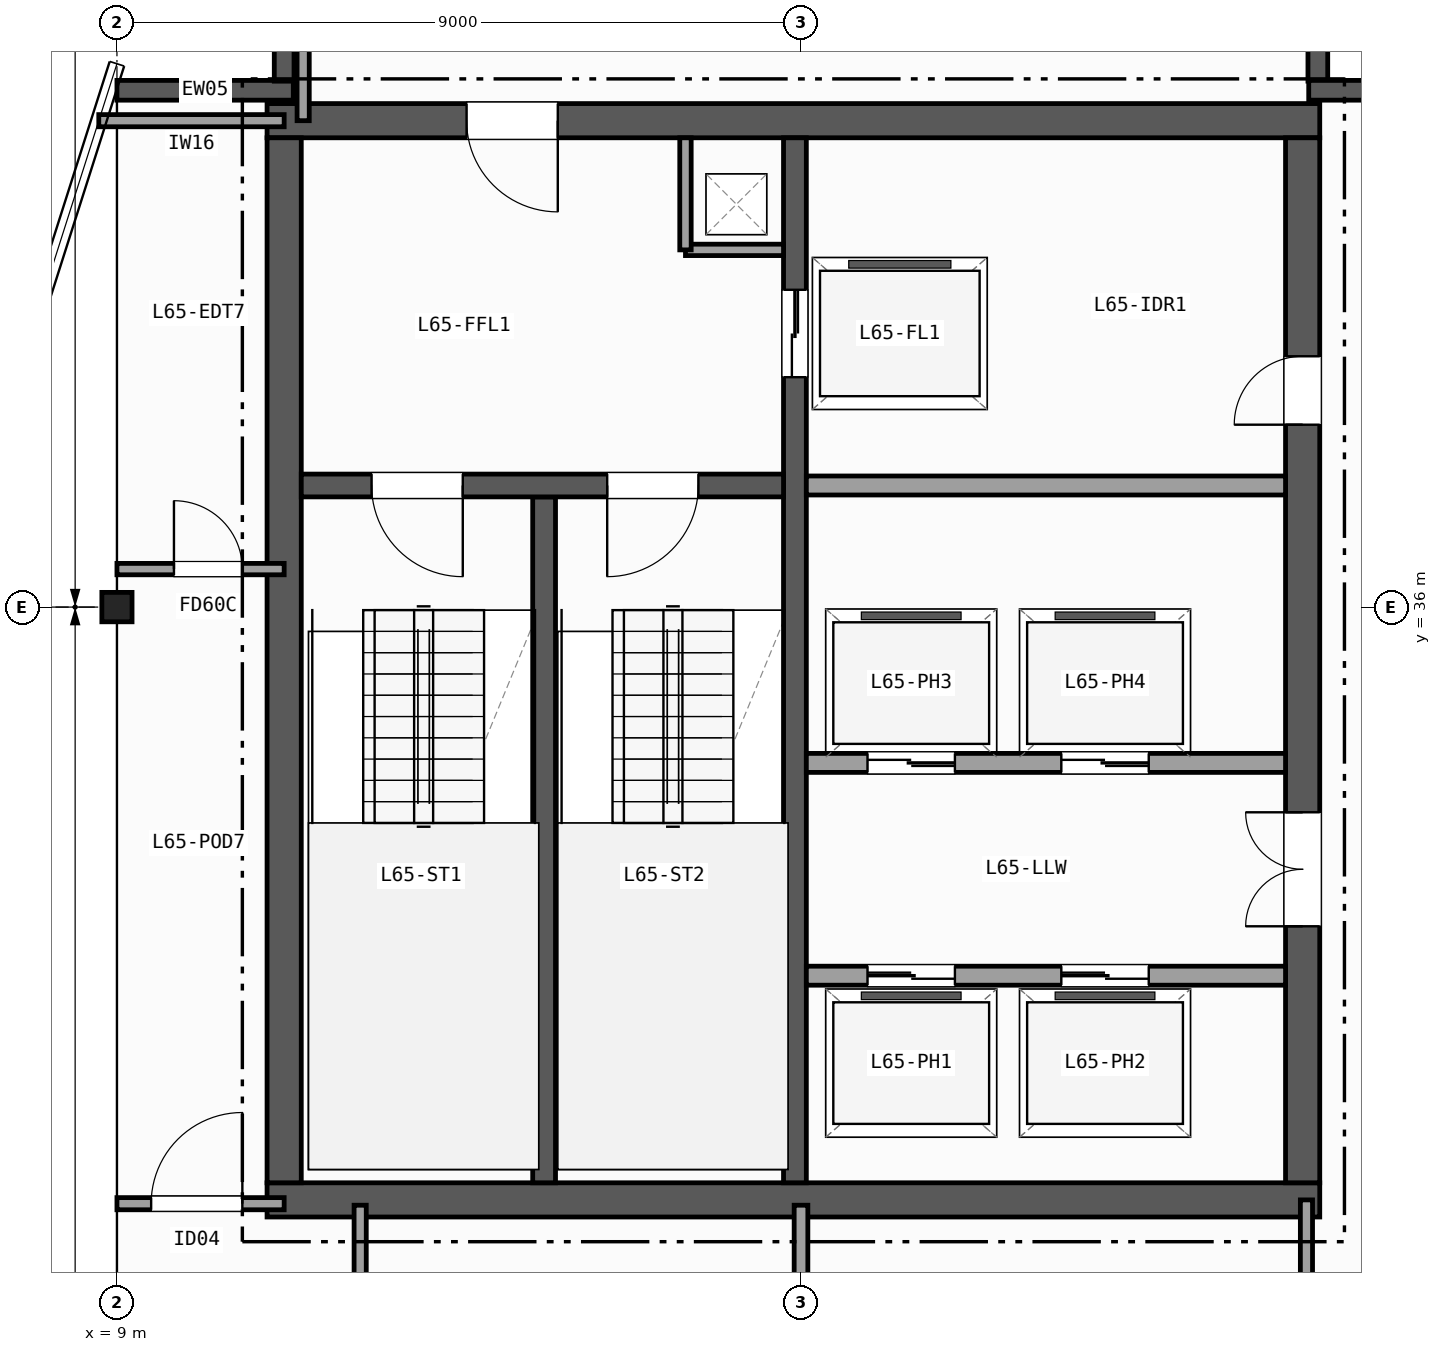
"""IFC4 building model, lengths in metres.
Left out: names, types, materials, properties, quantities, classifications, styles, units other than length and angle.
Written with IfcOpenShell. Run it as: python <this file> out.ifc"""

import sys

from ifc_helpers import new_model, si_unit, direction, frame, frame_2d, origin, origin_2d, place, context, subcontext, project, spatial, rectangle, i_section, extrude, element, fill, save


model = new_model("IFC4")
c1 = context("Model", 3, precision=1e-05, world=origin(), true_north=direction((0.0, 1.0)))
c2 = subcontext(c1, "Body", "Model", "MODEL_VIEW")
j1 = project(units=[si_unit("LENGTHUNIT", "METRE"), si_unit("PLANEANGLEUNIT", "RADIAN")], contexts=[c1])
p1 = place(None, origin())
s1 = spatial("IfcSite", under=j1, at=p1, CompositionType="ELEMENT")
p2 = place(p1, origin())
s2 = spatial("IfcBuilding", under=s1, at=p2, CompositionType="ELEMENT")
p3 = place(p2, frame((0.0, 0.0, 259.3)))
s3 = spatial("IfcBuildingStorey", under=s2, at=p3, CompositionType="ELEMENT", Elevation=259.3)
p4 = place(p3, frame((9.0, 36.0, 0.0), z_axis=(0.0, 0.0, 1.0), x_axis=(1.0, 0.0, 0.0)))
e1 = element("IfcColumn", 1, at=p4, inside=s3, PredefinedType="COLUMN", context=c2, shape_type="SweptSolid", body=[
    extrude(i_section(OverallWidth=0.397, OverallDepth=0.387, WebThickness=0.021, FlangeThickness=0.033, FilletRadius=0.015, at=origin_2d()), origin(), (0.0, 0.0, 1.0), 3.7),
])
p5 = place(p3, frame((9.0, 42.8, 0.0), z_axis=(0.0, 0.0, 1.0), x_axis=(1.0, 0.0, 0.0)))
e2 = element("IfcWall", 2, at=p5, inside=s3, PredefinedType="SOLIDWALL", context=c2, shape_type="SweptSolid", body=[
    extrude(rectangle(XDim=2.32, YDim=0.26, at=frame_2d((1.16, 0.0))), origin(), (0.0, 0.0, 1.0), 3.42),
])
for number, where, z_axis, x_axis in (
    (3, (11.2, 42.92, 0.0), (0.0, 0.0, 1.0), (0.0, 1.0, 0.0)),
    (4, (24.8, 45.0, 0.0), (0.0, 0.0, 1.0), (0.0, -1.0, 0.0)),
):
    element("IfcWall", number, at=place(p3, frame(where, z_axis=z_axis, x_axis=x_axis)), inside=s3, PredefinedType="SOLIDWALL", context=c2, shape_type="SweptSolid", body=[
        extrude(rectangle(XDim=2.08, YDim=0.26, at=frame_2d((1.04, 0.0))), origin(), (0.0, 0.0, 1.0), 3.42),
    ])
p6 = place(p3, frame((24.68, 42.8, 0.0), z_axis=(0.0, 0.0, 1.0), x_axis=(1.0, 0.0, 0.0)))
e5 = element("IfcWall", 5, at=p6, inside=s3, PredefinedType="SOLIDWALL", context=c2, shape_type="SweptSolid", body=[
    extrude(rectangle(XDim=2.32, YDim=0.26, at=frame_2d((1.16, 0.0))), origin(), (0.0, 0.0, 1.0), 3.42),
])
p7 = place(p3, frame((10.975, 28.2, 0.0), z_axis=(0.0, 0.0, 1.0), x_axis=(1.0, 0.0, 0.0)))
e6 = element("IfcWall", 6, at=p7, inside=s3, PredefinedType="SHEAR", context=c2, shape_type="SweptSolid", body=[
    extrude(rectangle(XDim=13.85, YDim=0.45, at=frame_2d((6.925, 0.0))), origin(), (0.0, 0.0, 1.0), 3.42),
])
p8 = place(p3, frame((24.825, 42.4, 0.0), z_axis=(0.0, 0.0, 1.0), x_axis=(-1.0, 0.0, 0.0)))
e7 = element("IfcWall", 7, at=p8, inside=s3, PredefinedType="SHEAR", context=c2, shape_type="SweptSolid", body=[
    extrude(rectangle(XDim=13.85, YDim=0.45, at=frame_2d((6.925, 0.0))), origin(), (0.0, 0.0, 1.0), 3.42),
])
p9 = place(p8, frame((10.025, 0.0, 0.0)))
e8 = element("IfcOpeningElement", 8, at=p9, cuts=e7, PredefinedType="OPENING", context=c2, shape_type="SweptSolid", body=[
    extrude(rectangle(XDim=1.2, YDim=2.15, at=frame_2d((0.6, 1.075))), frame((0.0, 0.235, 0.0), z_axis=(0.0, -1.0, 0.0), x_axis=(1.0, 0.0, 0.0)), (0.0, 0.0, 1.0), 0.47),
])
p10 = place(p3, frame((11.2, 42.175, 0.0), z_axis=(0.0, 0.0, 1.0), x_axis=(0.0, -1.0, 0.0)))
e9 = element("IfcWall", 9, at=p10, inside=s3, PredefinedType="SHEAR", context=c2, shape_type="SweptSolid", body=[
    extrude(rectangle(XDim=13.75, YDim=0.45, at=frame_2d((6.875, 0.0))), origin(), (0.0, 0.0, 1.0), 3.42),
])
p11 = place(p3, frame((24.6, 28.425, 0.0), z_axis=(0.0, 0.0, 1.0), x_axis=(0.0, 1.0, 0.0)))
e10 = element("IfcWall", 10, at=p11, inside=s3, PredefinedType="SHEAR", context=c2, shape_type="SweptSolid", body=[
    extrude(rectangle(XDim=13.75, YDim=0.45, at=frame_2d((6.875, 0.0))), origin(), (0.0, 0.0, 1.0), 3.42),
])
p12 = place(p11, frame((3.375, 0.0, 0.0)))
e11 = element("IfcOpeningElement", 11, at=p12, cuts=e10, PredefinedType="OPENING", context=c2, shape_type="SweptSolid", body=[
    extrude(rectangle(XDim=1.5, YDim=2.2, at=frame_2d((0.75, 1.1))), frame((0.0, 0.235, 0.0), z_axis=(0.0, -1.0, 0.0), x_axis=(1.0, 0.0, 0.0)), (0.0, 0.0, 1.0), 0.47),
])
p13 = place(p11, frame((9.975, 0.0, 0.0)))
e12 = element("IfcOpeningElement", 12, at=p13, cuts=e10, PredefinedType="OPENING", context=c2, shape_type="SweptSolid", body=[
    extrude(rectangle(XDim=0.9, YDim=2.1, at=frame_2d((0.45, 1.05))), frame((0.0, 0.235, 0.0), z_axis=(0.0, -1.0, 0.0), x_axis=(1.0, 0.0, 0.0)), (0.0, 0.0, 1.0), 0.47),
])
p14 = place(p3, frame((14.62, 28.425, 0.0), z_axis=(0.0, 0.0, 1.0), x_axis=(0.0, 1.0, 0.0)))
e13 = element("IfcWall", 13, at=p14, inside=s3, PredefinedType="SHEAR", context=c2, shape_type="SweptSolid", body=[
    extrude(rectangle(XDim=9.025, YDim=0.3, at=frame_2d((4.512, 0.0))), origin(), (0.0, 0.0, 1.0), 3.42),
])
p15 = place(p3, frame((17.92, 42.175, 0.0), z_axis=(0.0, 0.0, 1.0), x_axis=(0.0, -1.0, 0.0)))
e14 = element("IfcWall", 14, at=p15, inside=s3, PredefinedType="SHEAR", context=c2, shape_type="SweptSolid", body=[
    extrude(rectangle(XDim=13.75, YDim=0.3, at=frame_2d((6.875, 0.0))), origin(), (0.0, 0.0, 1.0), 3.42),
])
p16 = place(p15, frame((2.0, 0.0, 0.0)))
e15 = element("IfcOpeningElement", 15, at=p16, cuts=e14, PredefinedType="OPENING", context=c2, shape_type="SweptSolid", body=[
    extrude(rectangle(XDim=1.15, YDim=2.15, at=frame_2d((0.575, 1.075))), frame((0.0, 0.16, 0.0), z_axis=(0.0, -1.0, 0.0), x_axis=(1.0, 0.0, 0.0)), (0.0, 0.0, 1.0), 0.32),
])
p17 = place(p3, frame((17.77, 37.6, 0.0), z_axis=(0.0, 0.0, 1.0), x_axis=(-1.0, 0.0, 0.0)))
e16 = element("IfcWall", 16, at=p17, inside=s3, PredefinedType="SHEAR", context=c2, shape_type="SweptSolid", body=[
    extrude(rectangle(XDim=6.345, YDim=0.3, at=frame_2d((3.172, 0.0))), origin(), (0.0, 0.0, 1.0), 3.42),
])
p18 = place(p17, frame((4.22, 0.0, 0.0)))
e17 = element("IfcOpeningElement", 17, at=p18, cuts=e16, PredefinedType="OPENING", context=c2, shape_type="SweptSolid", body=[
    extrude(rectangle(XDim=1.2, YDim=2.15, at=frame_2d((0.6, 1.075))), frame((0.0, 0.16, 0.0), z_axis=(0.0, -1.0, 0.0), x_axis=(1.0, 0.0, 0.0)), (0.0, 0.0, 1.0), 0.32),
])
p19 = place(p17, frame((1.12, 0.0, 0.0)))
e18 = element("IfcOpeningElement", 18, at=p19, cuts=e16, PredefinedType="OPENING", context=c2, shape_type="SweptSolid", body=[
    extrude(rectangle(XDim=1.2, YDim=2.15, at=frame_2d((0.6, 1.075))), frame((0.0, 0.16, 0.0), z_axis=(0.0, -1.0, 0.0), x_axis=(1.0, 0.0, 0.0)), (0.0, 0.0, 1.0), 0.32),
])
p20 = place(p3, frame((16.48, 40.7, 0.0), z_axis=(0.0, 0.0, 1.0), x_axis=(1.0, 0.0, 0.0)))
e19 = element("IfcWall", 19, at=p20, inside=s3, PredefinedType="PARTITIONING", context=c2, shape_type="SweptSolid", body=[
    extrude(rectangle(XDim=1.29, YDim=0.15, at=frame_2d((0.645, 0.0))), origin(), (0.0, 0.0, 1.0), 3.42),
])
p21 = place(p3, frame((16.48, 40.7, 0.0), z_axis=(0.0, 0.0, 1.0), x_axis=(0.0, 1.0, 0.0)))
e20 = element("IfcWall", 20, at=p21, inside=s3, PredefinedType="PARTITIONING", context=c2, shape_type="SweptSolid", body=[
    extrude(rectangle(XDim=1.475, YDim=0.15, at=frame_2d((0.738, 0.0))), origin(), (0.0, 0.0, 1.0), 3.42),
])
p22 = place(p3, frame((18.07, 37.6, 0.0), z_axis=(0.0, 0.0, 1.0), x_axis=(1.0, 0.0, 0.0)))
e21 = element("IfcWall", 21, at=p22, inside=s3, PredefinedType="PARTITIONING", context=c2, shape_type="SweptSolid", body=[
    extrude(rectangle(XDim=6.305, YDim=0.25, at=frame_2d((3.152, 0.0))), origin(), (0.0, 0.0, 1.0), 3.42),
])
p23 = place(p3, frame((18.07, 31.15, 0.0), z_axis=(0.0, 0.0, 1.0), x_axis=(1.0, 0.0, 0.0)))
e22 = element("IfcWall", 22, at=p23, inside=s3, PredefinedType="PARTITIONING", context=c2, shape_type="SweptSolid", body=[
    extrude(rectangle(XDim=6.305, YDim=0.25, at=frame_2d((3.152, 0.0))), origin(), (0.0, 0.0, 1.0), 3.42),
])
p24 = place(p23, frame((0.805, 0.0, 0.0)))
e23 = element("IfcOpeningElement", 23, at=p24, cuts=e22, PredefinedType="OPENING", context=c2, shape_type="SweptSolid", body=[
    extrude(rectangle(XDim=1.15, YDim=2.15, at=frame_2d((0.575, 1.075))), frame((0.0, 0.135, 0.0), z_axis=(0.0, -1.0, 0.0), x_axis=(1.0, 0.0, 0.0)), (0.0, 0.0, 1.0), 0.27),
])
p25 = place(p23, frame((3.355, 0.0, 0.0)))
e24 = element("IfcOpeningElement", 24, at=p25, cuts=e22, PredefinedType="OPENING", context=c2, shape_type="SweptSolid", body=[
    extrude(rectangle(XDim=1.15, YDim=2.15, at=frame_2d((0.575, 1.075))), frame((0.0, 0.135, 0.0), z_axis=(0.0, -1.0, 0.0), x_axis=(1.0, 0.0, 0.0)), (0.0, 0.0, 1.0), 0.27),
])
p26 = place(p3, frame((24.375, 33.95, 0.0), z_axis=(0.0, 0.0, 1.0), x_axis=(-1.0, 0.0, 0.0)))
e25 = element("IfcWall", 25, at=p26, inside=s3, PredefinedType="PARTITIONING", context=c2, shape_type="SweptSolid", body=[
    extrude(rectangle(XDim=6.305, YDim=0.25, at=frame_2d((3.152, 0.0))), origin(), (0.0, 0.0, 1.0), 3.42),
])
p27 = place(p26, frame((4.35, 0.0, 0.0)))
e26 = element("IfcOpeningElement", 26, at=p27, cuts=e25, PredefinedType="OPENING", context=c2, shape_type="SweptSolid", body=[
    extrude(rectangle(XDim=1.15, YDim=2.15, at=frame_2d((0.575, 1.075))), frame((0.0, 0.135, 0.0), z_axis=(0.0, -1.0, 0.0), x_axis=(1.0, 0.0, 0.0)), (0.0, 0.0, 1.0), 0.27),
])
p28 = place(p26, frame((1.8, 0.0, 0.0)))
e27 = element("IfcOpeningElement", 27, at=p28, cuts=e25, PredefinedType="OPENING", context=c2, shape_type="SweptSolid", body=[
    extrude(rectangle(XDim=1.15, YDim=2.15, at=frame_2d((0.575, 1.075))), frame((0.0, 0.135, 0.0), z_axis=(0.0, -1.0, 0.0), x_axis=(1.0, 0.0, 0.0)), (0.0, 0.0, 1.0), 0.27),
])
p29 = place(p3, frame((9.0, 28.15, 0.0), z_axis=(0.0, 0.0, 1.0), x_axis=(1.0, 0.0, 0.0)))
e28 = element("IfcWall", 28, at=p29, inside=s3, PredefinedType="PARTITIONING", context=c2, shape_type="SweptSolid", body=[
    extrude(rectangle(XDim=2.2, YDim=0.16, at=frame_2d((1.1, 0.0))), origin(), (0.0, 0.0, 1.0), 2.707),
])
p30 = place(p29, frame((0.45, 0.0, 0.0)))
e29 = element("IfcOpeningElement", 29, at=p30, cuts=e28, PredefinedType="OPENING", context=c2, shape_type="SweptSolid", body=[
    extrude(rectangle(XDim=1.2, YDim=2.15, at=frame_2d((0.6, 1.075))), frame((0.0, 0.09, 0.0), z_axis=(0.0, -1.0, 0.0), x_axis=(1.0, 0.0, 0.0)), (0.0, 0.0, 1.0), 0.18),
])
p31 = place(p3, frame((8.761, 42.4, 0.0), z_axis=(0.0, 0.0, 1.0), x_axis=(1.0, 0.0, 0.0)))
e30 = element("IfcWall", 30, at=p31, inside=s3, PredefinedType="PARTITIONING", context=c2, shape_type="SweptSolid", body=[
    extrude(rectangle(XDim=2.439, YDim=0.16, at=frame_2d((1.219, 0.0))), origin(), (0.0, 0.0, 1.0), 3.42),
])
p32 = place(p3, frame((11.45, 42.4, 0.0), z_axis=(0.0, 0.0, 1.0), x_axis=(0.0, 1.0, 0.0)))
e31 = element("IfcWall", 31, at=p32, inside=s3, PredefinedType="PARTITIONING", context=c2, shape_type="SweptSolid", body=[
    extrude(rectangle(XDim=2.666, YDim=0.16, at=frame_2d((1.333, 0.0))), origin(), (0.0, 0.0, 1.0), 3.42),
])
p33 = place(p3, frame((9.0, 36.5, 0.0), z_axis=(0.0, 0.0, 1.0), x_axis=(1.0, 0.0, 0.0)))
e32 = element("IfcWall", 32, at=p33, inside=s3, PredefinedType="PARTITIONING", context=c2, shape_type="SweptSolid", body=[
    extrude(rectangle(XDim=2.2, YDim=0.15, at=frame_2d((1.1, 0.0))), origin(), (0.0, 0.0, 1.0), 3.42),
])
p34 = place(p33, frame((0.75, 0.0, 0.0)))
e33 = element("IfcOpeningElement", 33, at=p34, cuts=e32, PredefinedType="OPENING", context=c2, shape_type="SweptSolid", body=[
    extrude(rectangle(XDim=0.9, YDim=2.1, at=frame_2d((0.45, 1.05))), frame((0.0, 0.085, 0.0), z_axis=(0.0, -1.0, 0.0), x_axis=(1.0, 0.0, 0.0)), (0.0, 0.0, 1.0), 0.17),
])
p35 = place(p3, frame((24.65, 9.0, 0.0), z_axis=(0.0, 0.0, 1.0), x_axis=(0.0, 1.0, 0.0)))
e34 = element("IfcWall", 34, at=p35, inside=s3, PredefinedType="PARTITIONING", context=c2, shape_type="SweptSolid", body=[
    extrude(rectangle(XDim=19.2, YDim=0.16, at=frame_2d((9.6, 0.0))), origin(), (0.0, 0.0, 1.0), 2.707),
])
p36 = place(p35, frame((8.6, 0.0, 0.0)))
e35 = element("IfcOpeningElement", 35, at=p36, cuts=e34, PredefinedType="OPENING", context=c2, shape_type="SweptSolid", body=[
    extrude(rectangle(XDim=0.95, YDim=2.1, at=frame_2d((0.475, 1.05))), frame((0.0, 0.09, 0.0), z_axis=(0.0, -1.0, 0.0), x_axis=(1.0, 0.0, 0.0)), (0.0, 0.0, 1.0), 0.18),
])
p37 = place(p35, frame((2.55, 0.0, 0.0)))
e36 = element("IfcOpeningElement", 36, at=p37, cuts=e34, PredefinedType="OPENING", context=c2, shape_type="SweptSolid", body=[
    extrude(rectangle(XDim=1.0, YDim=2.1, at=frame_2d((0.5, 1.05))), frame((0.0, 0.09, 0.0), z_axis=(0.0, -1.0, 0.0), x_axis=(1.0, 0.0, 0.0)), (0.0, 0.0, 1.0), 0.18),
])
p38 = place(p3, frame((18.0, 15.8, 0.0), z_axis=(0.0, 0.0, 1.0), x_axis=(0.0, 1.0, 0.0)))
e37 = element("IfcWall", 37, at=p38, inside=s3, PredefinedType="PARTITIONING", context=c2, shape_type="SweptSolid", body=[
    extrude(rectangle(XDim=12.33, YDim=0.18, at=frame_2d((6.165, 0.0))), origin(), (0.0, 0.0, 1.0), 2.789),
])
p39 = place(p38, frame((5.7, 0.0, 0.0)))
e38 = element("IfcOpeningElement", 38, at=p39, cuts=e37, PredefinedType="OPENING", context=c2, shape_type="SweptSolid", body=[
    extrude(rectangle(XDim=1.05, YDim=2.15, at=frame_2d((0.525, 1.075))), frame((0.0, 0.1, 0.0), z_axis=(0.0, -1.0, 0.0), x_axis=(1.0, 0.0, 0.0)), (0.0, 0.0, 1.0), 0.2),
])
p40 = place(p3, frame((12.2, 18.0, 0.0), z_axis=(0.0, 0.0, 1.0), x_axis=(0.0, 1.0, 0.0)))
e39 = element("IfcWall", 39, at=p40, inside=s3, PredefinedType="PARTITIONING", context=c2, shape_type="SweptSolid", body=[
    extrude(rectangle(XDim=10.13, YDim=0.16, at=frame_2d((5.065, 0.0))), origin(), (0.0, 0.0, 1.0), 2.789),
])
p41 = place(p40, frame((2.5, 0.0, 0.0)))
e40 = element("IfcOpeningElement", 40, at=p41, cuts=e39, PredefinedType="OPENING", context=c2, shape_type="SweptSolid", body=[
    extrude(rectangle(XDim=1.2, YDim=2.15, at=frame_2d((0.6, 1.075))), frame((0.0, 0.09, 0.0), z_axis=(0.0, -1.0, 0.0), x_axis=(1.0, 0.0, 0.0)), (0.0, 0.0, 1.0), 0.18),
])
p42 = place(p18, origin())
e41 = element("IfcDoor", 41, at=p42, inside=s3, OperationType="SINGLE_SWING_LEFT", PredefinedType="DOOR", context=c2, shape_type="SweptSolid", body=[
    extrude(rectangle(XDim=1.2, YDim=2.15, at=frame_2d((0.6, 1.075))), frame((0.0, 0.025, 0.0), z_axis=(0.0, -1.0, 0.0), x_axis=(1.0, 0.0, 0.0)), (0.0, 0.0, 1.0), 0.05),
])
fill(e17, e41)
p43 = place(p19, origin())
e42 = element("IfcDoor", 42, at=p43, inside=s3, OperationType="SINGLE_SWING_RIGHT", PredefinedType="DOOR", context=c2, shape_type="SweptSolid", body=[
    extrude(rectangle(XDim=1.2, YDim=2.15, at=frame_2d((0.6, 1.075))), frame((0.0, 0.025, 0.0), z_axis=(0.0, -1.0, 0.0), x_axis=(1.0, 0.0, 0.0)), (0.0, 0.0, 1.0), 0.05),
])
fill(e18, e42)
p44 = place(p12, origin())
e43 = element("IfcDoor", 43, at=p44, inside=s3, OperationType="DOUBLE_DOOR_SINGLE_SWING", PredefinedType="DOOR", context=c2, shape_type="SweptSolid", body=[
    extrude(rectangle(XDim=1.5, YDim=2.2, at=frame_2d((0.75, 1.1))), frame((0.0, 0.025, 0.0), z_axis=(0.0, -1.0, 0.0), x_axis=(1.0, 0.0, 0.0)), (0.0, 0.0, 1.0), 0.05),
])
fill(e11, e43)
p45 = place(p9, origin())
e44 = element("IfcDoor", 44, at=p45, inside=s3, OperationType="SINGLE_SWING_LEFT", PredefinedType="DOOR", context=c2, shape_type="SweptSolid", body=[
    extrude(rectangle(XDim=1.2, YDim=2.15, at=frame_2d((0.6, 1.075))), frame((0.0, 0.025, 0.0), z_axis=(0.0, -1.0, 0.0), x_axis=(1.0, 0.0, 0.0)), (0.0, 0.0, 1.0), 0.05),
])
fill(e8, e44)
p46 = place(p13, origin())
e45 = element("IfcDoor", 45, at=p46, inside=s3, OperationType="SINGLE_SWING_LEFT", PredefinedType="DOOR", context=c2, shape_type="SweptSolid", body=[
    extrude(rectangle(XDim=0.9, YDim=2.1, at=frame_2d((0.45, 1.05))), frame((0.0, 0.025, 0.0), z_axis=(0.0, -1.0, 0.0), x_axis=(1.0, 0.0, 0.0)), (0.0, 0.0, 1.0), 0.05),
])
fill(e12, e45)
p47 = place(p16, origin())
e46 = element("IfcDoor", 46, at=p47, inside=s3, OperationType="DOUBLE_DOOR_SLIDING", PredefinedType="DOOR", context=c2, shape_type="SweptSolid", body=[
    extrude(rectangle(XDim=1.15, YDim=2.15, at=frame_2d((0.575, 1.075))), frame((0.0, 0.025, 0.0), z_axis=(0.0, -1.0, 0.0), x_axis=(1.0, 0.0, 0.0)), (0.0, 0.0, 1.0), 0.05),
])
fill(e15, e46)
p48 = place(p24, origin())
e47 = element("IfcDoor", 47, at=p48, inside=s3, OperationType="DOUBLE_DOOR_SLIDING", PredefinedType="DOOR", context=c2, shape_type="SweptSolid", body=[
    extrude(rectangle(XDim=1.15, YDim=2.15, at=frame_2d((0.575, 1.075))), frame((0.0, 0.025, 0.0), z_axis=(0.0, -1.0, 0.0), x_axis=(1.0, 0.0, 0.0)), (0.0, 0.0, 1.0), 0.05),
])
fill(e23, e47)
p49 = place(p25, origin())
e48 = element("IfcDoor", 48, at=p49, inside=s3, OperationType="DOUBLE_DOOR_SLIDING", PredefinedType="DOOR", context=c2, shape_type="SweptSolid", body=[
    extrude(rectangle(XDim=1.15, YDim=2.15, at=frame_2d((0.575, 1.075))), frame((0.0, 0.025, 0.0), z_axis=(0.0, -1.0, 0.0), x_axis=(1.0, 0.0, 0.0)), (0.0, 0.0, 1.0), 0.05),
])
fill(e24, e48)
p50 = place(p27, origin())
e49 = element("IfcDoor", 49, at=p50, inside=s3, OperationType="DOUBLE_DOOR_SLIDING", PredefinedType="DOOR", context=c2, shape_type="SweptSolid", body=[
    extrude(rectangle(XDim=1.15, YDim=2.15, at=frame_2d((0.575, 1.075))), frame((0.0, 0.025, 0.0), z_axis=(0.0, -1.0, 0.0), x_axis=(1.0, 0.0, 0.0)), (0.0, 0.0, 1.0), 0.05),
])
fill(e26, e49)
p51 = place(p28, origin())
e50 = element("IfcDoor", 50, at=p51, inside=s3, OperationType="DOUBLE_DOOR_SLIDING", PredefinedType="DOOR", context=c2, shape_type="SweptSolid", body=[
    extrude(rectangle(XDim=1.15, YDim=2.15, at=frame_2d((0.575, 1.075))), frame((0.0, 0.025, 0.0), z_axis=(0.0, -1.0, 0.0), x_axis=(1.0, 0.0, 0.0)), (0.0, 0.0, 1.0), 0.05),
])
fill(e27, e50)
p52 = place(p30, origin())
e51 = element("IfcDoor", 51, at=p52, inside=s3, OperationType="SINGLE_SWING_RIGHT", PredefinedType="DOOR", context=c2, shape_type="SweptSolid", body=[
    extrude(rectangle(XDim=1.2, YDim=2.15, at=frame_2d((0.6, 1.075))), frame((0.0, 0.025, 0.0), z_axis=(0.0, -1.0, 0.0), x_axis=(1.0, 0.0, 0.0)), (0.0, 0.0, 1.0), 0.05),
])
fill(e29, e51)
p53 = place(p34, origin())
e52 = element("IfcDoor", 52, at=p53, inside=s3, OperationType="SINGLE_SWING_LEFT", PredefinedType="DOOR", context=c2, shape_type="SweptSolid", body=[
    extrude(rectangle(XDim=0.9, YDim=2.1, at=frame_2d((0.45, 1.05))), frame((0.0, 0.025, 0.0), z_axis=(0.0, -1.0, 0.0), x_axis=(1.0, 0.0, 0.0)), (0.0, 0.0, 1.0), 0.05),
])
fill(e33, e52)
save(model, sys.argv[1])
